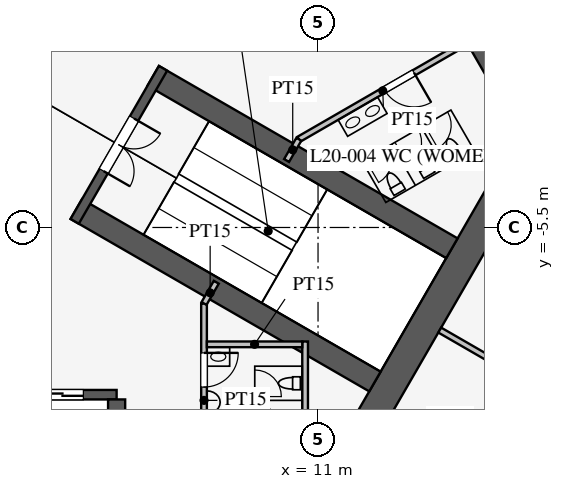
"""IFC4 building model, lengths in metres.
Left out: names, types, materials, properties, quantities, classifications, styles, units other than length and angle.
Written with IfcOpenShell. Run it as: python <this file> out.ifc"""

import sys

from ifc_helpers import new_model, si_unit, direction, frame, frame_2d, origin, place, context, subcontext, project, spatial, rectangle, extrude, element, fill, save


model = new_model("IFC4")
c1 = context("Model", 3, precision=1e-05, world=origin(), true_north=direction((0.0, 1.0)))
c2 = subcontext(c1, "Body", "Model", "MODEL_VIEW")
j1 = project(units=[si_unit("LENGTHUNIT", "METRE"), si_unit("PLANEANGLEUNIT", "RADIAN")], contexts=[c1])
p1 = place(None, origin())
s1 = spatial("IfcSite", under=j1, at=p1, CompositionType="ELEMENT")
p2 = place(p1, origin())
s2 = spatial("IfcBuilding", under=s1, at=p2, CompositionType="ELEMENT")
p3 = place(p2, frame((0.0, 0.0, 87.9)))
s3 = spatial("IfcBuildingStorey", under=s2, at=p3, CompositionType="ELEMENT", Elevation=87.9)
p4 = place(p3, frame((10.97, -13.0, 0.0), z_axis=(0.0, 0.0, 1.0), x_axis=(0.499995765644, 0.866027848477, 0.0)))
e1 = element("IfcWall", 1, at=p4, inside=s3, PredefinedType="SHEAR", context=c2, shape_type="SweptSolid", body=[
    extrude(rectangle(XDim=11.547, YDim=0.8, at=frame_2d((5.773, 0.0))), origin(), (0.0, 0.0, 1.0), 4.2),
])
p5 = place(p3, frame((16.743, -3.0, 0.0), z_axis=(0.0, 0.0, 1.0), x_axis=(-0.500002442456, 0.866023993627, 0.0)))
e2 = element("IfcWall", 2, at=p5, inside=s3, PredefinedType="SHEAR", context=c2, shape_type="SweptSolid", body=[
    extrude(rectangle(XDim=21.939, YDim=0.8, at=frame_2d((10.97, 0.0))), origin(), (0.0, 0.0, 1.0), 4.2),
])
p6 = place(p5, frame((17.27, 0.0, 0.0)))
e3 = element("IfcOpeningElement", 3, at=p6, cuts=e2, PredefinedType="OPENING", context=c2, shape_type="SweptSolid", body=[
    extrude(rectangle(XDim=1.2, YDim=2.1, at=frame_2d((0.6, 1.05))), frame((0.0, 0.41, 0.0), z_axis=(0.0, -1.0, 0.0), x_axis=(1.0, 0.0, 0.0)), (0.0, 0.0, 1.0), 0.82),
])
p7 = place(p5, frame((3.47, 0.0, 0.0)))
e4 = element("IfcOpeningElement", 4, at=p7, cuts=e2, PredefinedType="OPENING", context=c2, shape_type="SweptSolid", body=[
    extrude(rectangle(XDim=1.2, YDim=2.1, at=frame_2d((0.6, 1.05))), frame((0.0, 0.41, 0.0), z_axis=(0.0, -1.0, 0.0), x_axis=(1.0, 0.0, 0.0)), (0.0, 0.0, 1.0), 0.82),
])
p8 = place(p3, frame((-5.7, -9.9, 0.0), z_axis=(0.0, 0.0, 1.0), x_axis=(1.0, 0.0, 0.0)))
e5 = element("IfcWall", 5, at=p8, inside=s3, PredefinedType="SHEAR", context=c2, shape_type="SweptSolid", body=[
    extrude(rectangle(XDim=11.4, YDim=0.25, at=frame_2d((5.7, 0.0))), origin(), (0.0, 0.0, 1.0), 4.2),
])
p9 = place(p8, frame((0.875, 0.0, 0.0)))
e6 = element("IfcOpeningElement", 6, at=p9, cuts=e5, PredefinedType="OPENING", context=c2, shape_type="SweptSolid", body=[
    extrude(rectangle(XDim=1.1, YDim=2.2, at=frame_2d((0.55, 1.1))), frame((0.0, 0.135, 0.0), z_axis=(0.0, -1.0, 0.0), x_axis=(1.0, 0.0, 0.0)), (0.0, 0.0, 1.0), 0.27),
])
p10 = place(p8, frame((3.725, 0.0, 0.0)))
e7 = element("IfcOpeningElement", 7, at=p10, cuts=e5, PredefinedType="OPENING", context=c2, shape_type="SweptSolid", body=[
    extrude(rectangle(XDim=1.1, YDim=2.2, at=frame_2d((0.55, 1.1))), frame((0.0, 0.135, 0.0), z_axis=(0.0, -1.0, 0.0), x_axis=(1.0, 0.0, 0.0)), (0.0, 0.0, 1.0), 0.27),
])
p11 = place(p8, frame((6.575, 0.0, 0.0)))
e8 = element("IfcOpeningElement", 8, at=p11, cuts=e5, PredefinedType="OPENING", context=c2, shape_type="SweptSolid", body=[
    extrude(rectangle(XDim=1.1, YDim=2.2, at=frame_2d((0.55, 1.1))), frame((0.0, 0.135, 0.0), z_axis=(0.0, -1.0, 0.0), x_axis=(1.0, 0.0, 0.0)), (0.0, 0.0, 1.0), 0.27),
])
p12 = place(p8, frame((9.425, 0.0, 0.0)))
e9 = element("IfcOpeningElement", 9, at=p12, cuts=e5, PredefinedType="OPENING", context=c2, shape_type="SweptSolid", body=[
    extrude(rectangle(XDim=1.1, YDim=2.2, at=frame_2d((0.55, 1.1))), frame((0.0, 0.135, 0.0), z_axis=(0.0, -1.0, 0.0), x_axis=(1.0, 0.0, 0.0)), (0.0, 0.0, 1.0), 0.27),
])
p13 = place(p3, frame((5.7, -10.025, 0.0), z_axis=(0.0, 0.0, 1.0), x_axis=(0.0, -1.0, 0.0)))
e10 = element("IfcWall", 10, at=p13, inside=s3, PredefinedType="SHEAR", context=c2, shape_type="SweptSolid", body=[
    extrude(rectangle(XDim=2.575, YDim=0.45, at=frame_2d((1.288, 0.0))), origin(), (0.0, 0.0, 1.0), 4.2),
])
for number, where, z_axis, x_axis in (
    (11, (4.638, -5.016, 0.0), (0.0, 0.0, 1.0), (0.866, -0.5, 0.0)),
    (12, (6.663, -1.509, 0.0), (0.0, 0.0, 1.0), (0.866, -0.5, 0.0)),
):
    element("IfcWall", number, at=place(p3, frame(where, z_axis=z_axis, x_axis=x_axis)), inside=s3, PredefinedType="SHEAR", context=c2, shape_type="SweptSolid", body=[
        extrude(rectangle(XDim=9.075, YDim=0.6, at=frame_2d((4.538, 0.0))), origin(), (0.0, 0.0, 1.0), 4.2),
    ])
p14 = place(p3, frame((4.597, -5.339, 0.0), z_axis=(0.0, 0.0, 1.0), x_axis=(0.499984536904, 0.866034331223, 0.0)))
e13 = element("IfcWall", 13, at=p14, inside=s3, PredefinedType="SHEAR", context=c2, shape_type="SweptSolid", body=[
    extrude(rectangle(XDim=4.65, YDim=0.25, at=frame_2d((2.325, 0.0))), origin(), (0.0, 0.0, 1.0), 4.2),
])
p15 = place(p14, frame((1.525, 0.0, 0.0)))
e14 = element("IfcOpeningElement", 14, at=p15, cuts=e13, PredefinedType="OPENING", context=c2, shape_type="SweptSolid", body=[
    extrude(rectangle(XDim=1.6, YDim=2.1, at=frame_2d((0.8, 1.05))), frame((0.0, 0.135, 0.0), z_axis=(0.0, -1.0, 0.0), x_axis=(1.0, 0.0, 0.0)), (0.0, 0.0, 1.0), 0.27),
])
p16 = place(p3, frame((8.0, -7.5, 0.0), z_axis=(0.0, 0.0, 1.0), x_axis=(0.0, -1.0, 0.0)))
e15 = element("IfcWall", 15, at=p16, inside=s3, PredefinedType="PARTITIONING", context=c2, shape_type="SweptSolid", body=[
    extrude(rectangle(XDim=5.1, YDim=0.15, at=frame_2d((2.55, 0.0))), origin(), (0.0, 0.0, 1.0), 3.95),
])
p17 = place(p16, frame((1.3, 0.0, 0.0)))
e16 = element("IfcOpeningElement", 16, at=p17, cuts=e15, PredefinedType="OPENING", context=c2, shape_type="SweptSolid", body=[
    extrude(rectangle(XDim=0.9, YDim=2.1, at=frame_2d((0.45, 1.05))), frame((0.0, 0.085, 0.0), z_axis=(0.0, -1.0, 0.0), x_axis=(1.0, 0.0, 0.0)), (0.0, 0.0, 1.0), 0.17),
])
p18 = place(p3, frame((10.495, -3.178, 0.0), z_axis=(0.0, 0.0, 1.0), x_axis=(0.86602216432, 0.500005610874, 0.0)))
e17 = element("IfcWall", 17, at=p18, inside=s3, PredefinedType="PARTITIONING", context=c2, shape_type="SweptSolid", body=[
    extrude(rectangle(XDim=5.1, YDim=0.15, at=frame_2d((2.55, 0.0))), origin(), (0.0, 0.0, 1.0), 3.95),
])
p19 = place(p18, frame((2.6, 0.0, 0.0)))
e18 = element("IfcOpeningElement", 18, at=p19, cuts=e17, PredefinedType="OPENING", context=c2, shape_type="SweptSolid", body=[
    extrude(rectangle(XDim=0.9, YDim=2.1, at=frame_2d((0.45, 1.05))), frame((0.0, 0.085, 0.0), z_axis=(0.0, -1.0, 0.0), x_axis=(1.0, 0.0, 0.0)), (0.0, 0.0, 1.0), 0.17),
])
for number, where, z_axis, x_axis in (
    (19, (8.0, -7.5, 0.0), (0.0, 0.0, 1.0), (0.5, 0.866, 0.0)),
    (20, (10.495, -3.178, 0.0), (0.0, 0.0, 1.0), (-0.5, -0.866, 0.0)),
):
    element("IfcWall", number, at=place(p3, frame(where, z_axis=z_axis, x_axis=x_axis)), inside=s3, PredefinedType="PARTITIONING", context=c2, shape_type="SweptSolid", body=[
        extrude(rectangle(XDim=0.645, YDim=0.15, at=frame_2d((0.323, 0.0))), origin(), (0.0, 0.0, 1.0), 3.95),
    ])
p20 = place(p3, frame((10.66, -8.5, 0.0), z_axis=(0.0, 0.0, 1.0), x_axis=(0.0, -1.0, 0.0)))
e21 = element("IfcWall", 21, at=p20, inside=s3, PredefinedType="PARTITIONING", context=c2, shape_type="SweptSolid", body=[
    extrude(rectangle(XDim=4.1, YDim=0.15, at=frame_2d((2.05, 0.0))), origin(), (0.0, 0.0, 1.0), 3.95),
])
p21 = place(p3, frame((8.075, -8.575, 0.0), z_axis=(0.0, 0.0, 1.0), x_axis=(1.0, 0.0, 0.0)))
e22 = element("IfcWall", 22, at=p21, inside=s3, PredefinedType="PARTITIONING", context=c2, shape_type="SweptSolid", body=[
    extrude(rectangle(XDim=2.51, YDim=0.15, at=frame_2d((1.255, 0.0))), origin(), (0.0, 0.0, 1.0), 3.95),
])
p22 = place(p3, frame((14.203, -8.2, 0.0), z_axis=(0.0, 0.0, 1.0), x_axis=(0.866024965723, -0.500000758745, 0.0)))
e23 = element("IfcWall", 23, at=p22, inside=s3, PredefinedType="PARTITIONING", context=c2, shape_type="SweptSolid", body=[
    extrude(rectangle(XDim=18.25, YDim=0.15, at=frame_2d((9.125, 0.0))), origin(), (0.0, 0.0, 1.0), 1.95),
])
p23 = place(p17, origin())
e24 = element("IfcDoor", 24, at=p23, inside=s3, OperationType="SINGLE_SWING_LEFT", PredefinedType="DOOR", context=c2, shape_type="SweptSolid", body=[
    extrude(rectangle(XDim=0.9, YDim=2.1, at=frame_2d((0.45, 1.05))), frame((0.0, 0.025, 0.0), z_axis=(0.0, -1.0, 0.0), x_axis=(1.0, 0.0, 0.0)), (0.0, 0.0, 1.0), 0.05),
])
fill(e16, e24)
p24 = place(p19, frame((0.9, 0.0, 0.0), z_axis=(0.0, 0.0, 1.0), x_axis=(-1.0, 0.0, 0.0)))
e25 = element("IfcDoor", 25, at=p24, inside=s3, OperationType="SINGLE_SWING_LEFT", PredefinedType="DOOR", context=c2, shape_type="SweptSolid", body=[
    extrude(rectangle(XDim=0.9, YDim=2.1, at=frame_2d((0.45, 1.05))), frame((0.0, 0.025, 0.0), z_axis=(0.0, -1.0, 0.0), x_axis=(1.0, 0.0, 0.0)), (0.0, 0.0, 1.0), 0.05),
])
fill(e18, e25)
p25 = place(p15, frame((1.6, 0.0, 0.0), z_axis=(0.0, 0.0, 1.0), x_axis=(-1.0, 0.0, 0.0)))
e26 = element("IfcDoor", 26, at=p25, inside=s3, OperationType="DOUBLE_DOOR_SINGLE_SWING", PredefinedType="DOOR", context=c2, shape_type="SweptSolid", body=[
    extrude(rectangle(XDim=1.6, YDim=2.1, at=frame_2d((0.8, 1.05))), frame((0.0, 0.025, 0.0), z_axis=(0.0, -1.0, 0.0), x_axis=(1.0, 0.0, 0.0)), (0.0, 0.0, 1.0), 0.05),
])
fill(e14, e26)
p26 = place(p12, origin())
e27 = element("IfcDoor", 27, at=p26, inside=s3, OperationType="DOUBLE_DOOR_SLIDING", PredefinedType="DOOR", context=c2, shape_type="SweptSolid", body=[
    extrude(rectangle(XDim=1.1, YDim=2.2, at=frame_2d((0.55, 1.1))), frame((0.0, 0.025, 0.0), z_axis=(0.0, -1.0, 0.0), x_axis=(1.0, 0.0, 0.0)), (0.0, 0.0, 1.0), 0.05),
])
fill(e9, e27)
save(model, sys.argv[1])
